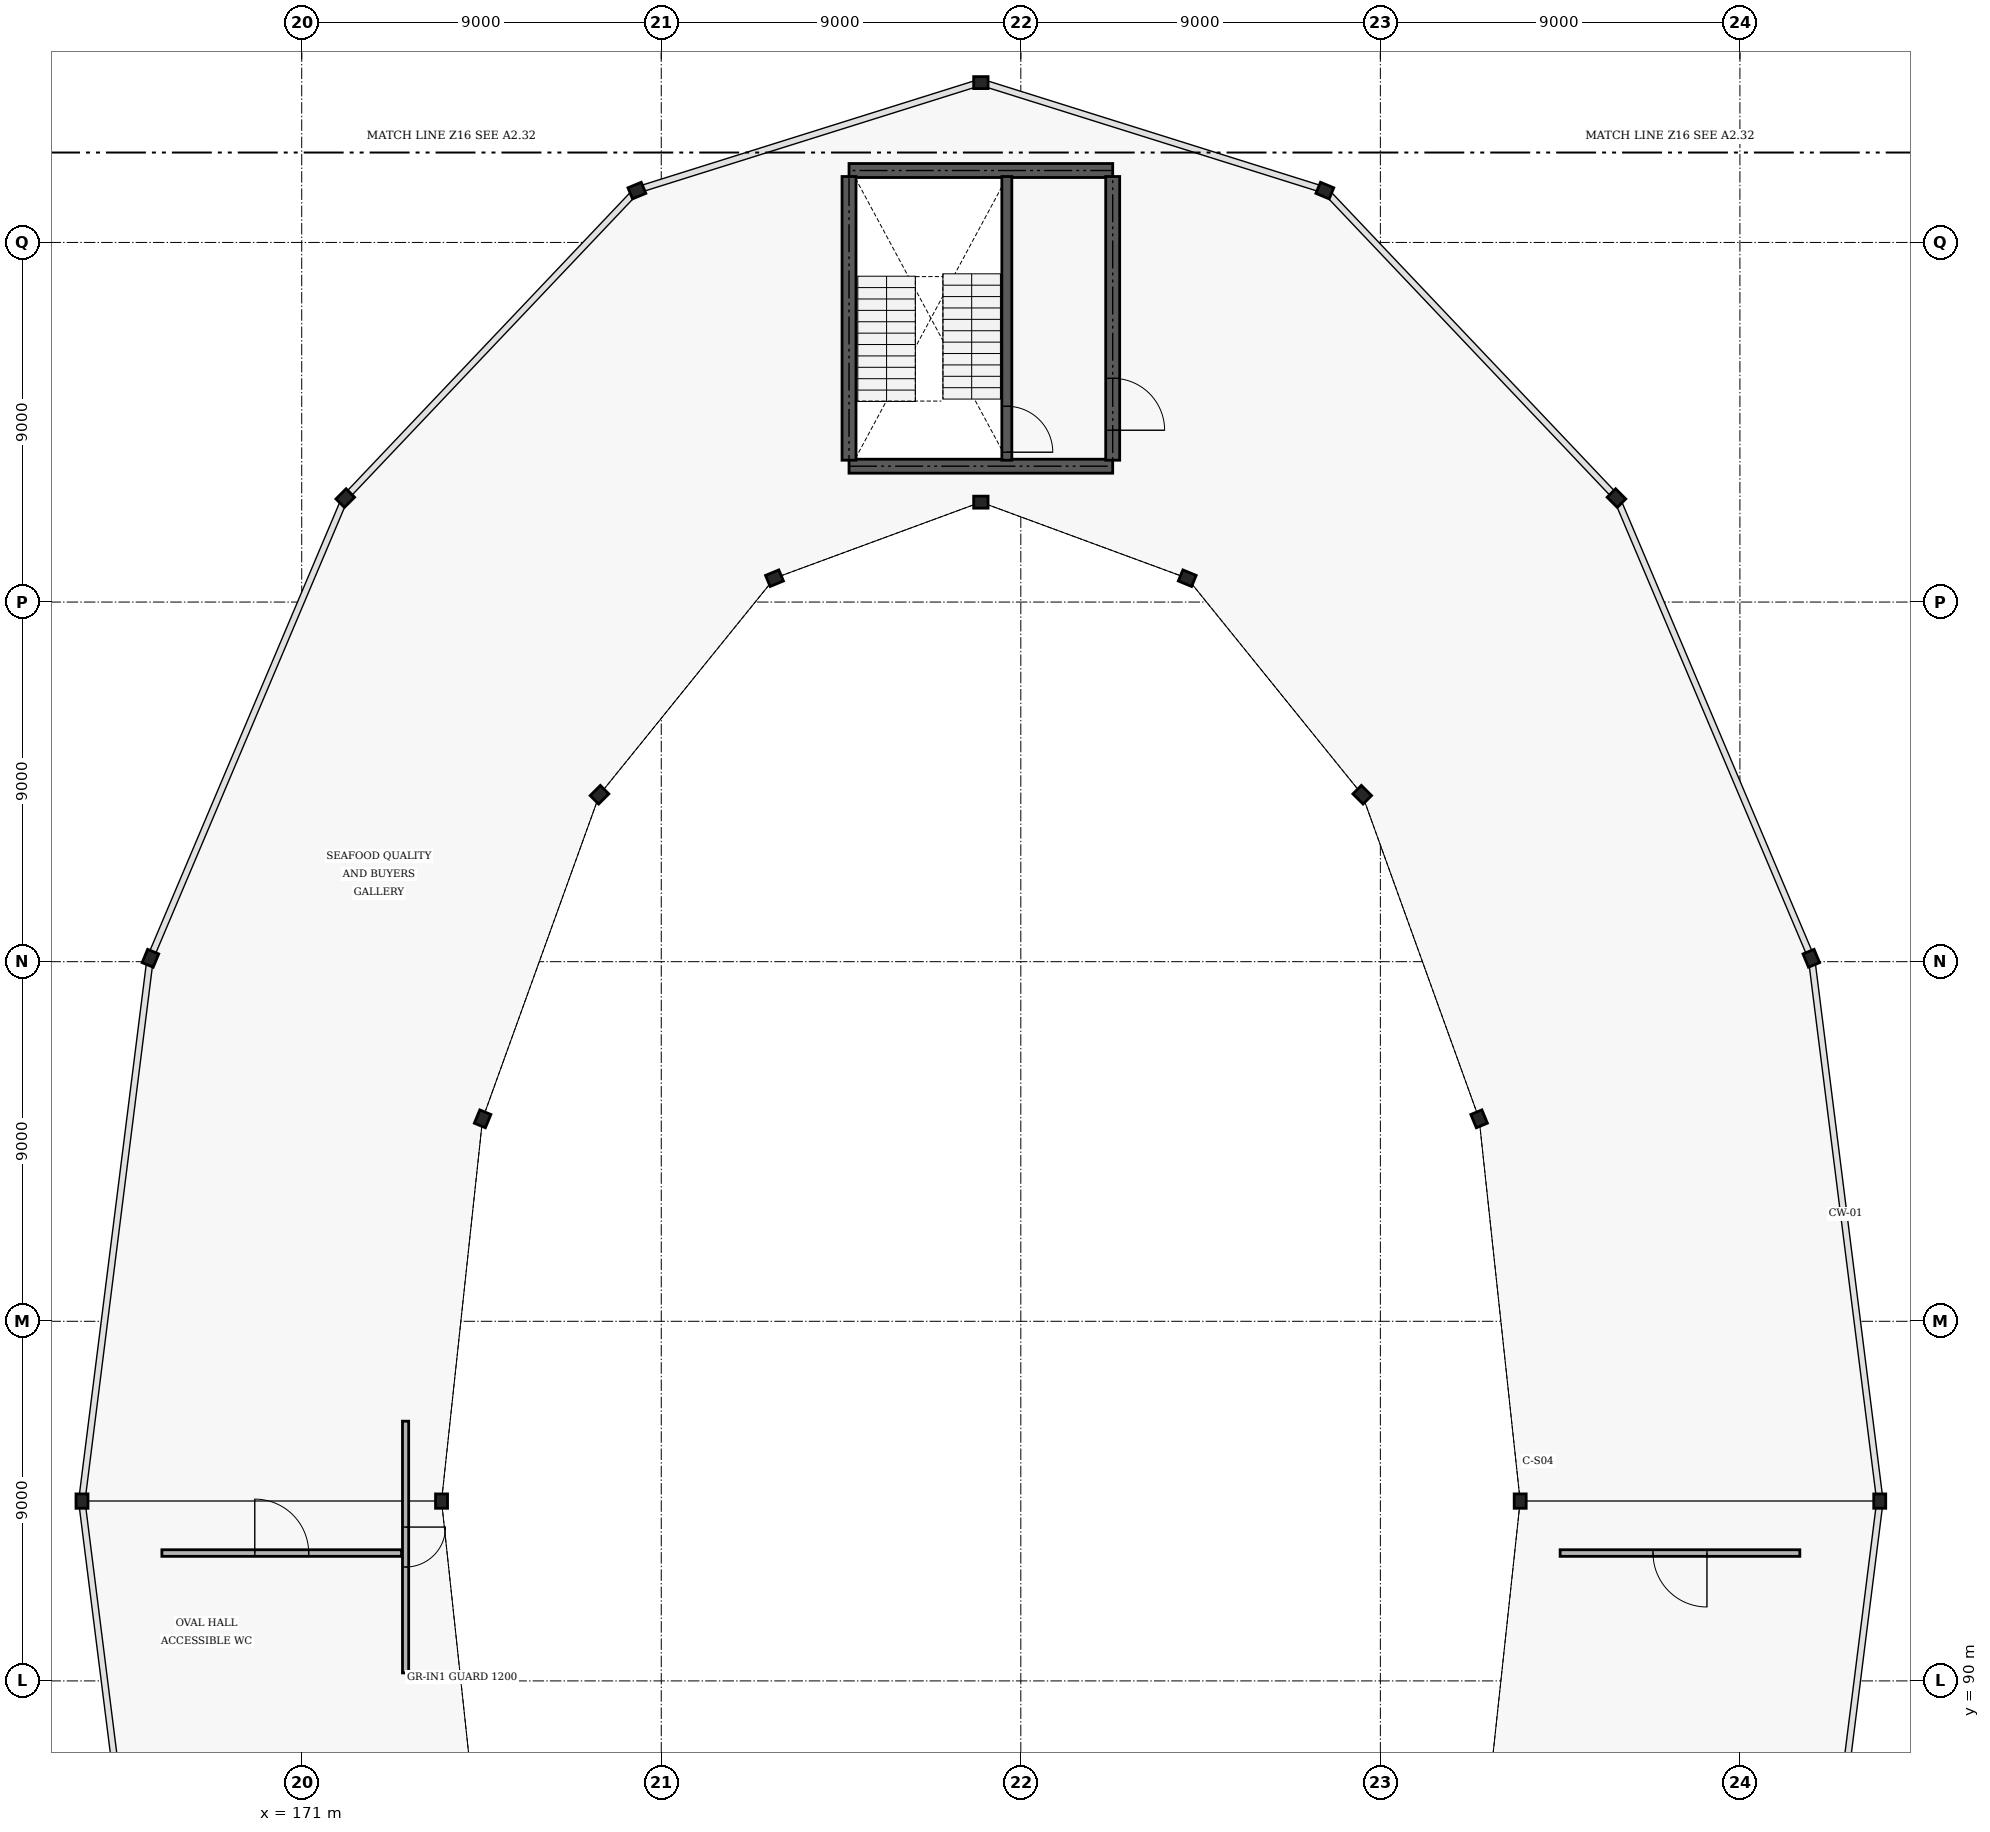
"""IFC4 building model, lengths in metres.
Left out: names, types, materials, properties, quantities, classifications, styles, units other than length and angle.
Written with IfcOpenShell. Run it as: python <this file> out.ifc"""

import sys

from ifc_helpers import new_model, si_unit, direction, frame, frame_2d, origin, origin_2d, place, context, subcontext, project, spatial, rectangle, i_section, extrude, element, fill, save


model = new_model("IFC4")
c1 = context("Model", 3, precision=1e-05, world=origin(), true_north=direction((0.0, 1.0)))
c2 = subcontext(c1, "Body", "Model", "MODEL_VIEW")
j1 = project(units=[si_unit("LENGTHUNIT", "METRE"), si_unit("PLANEANGLEUNIT", "RADIAN")], contexts=[c1])
p1 = place(None, origin())
s1 = spatial("IfcSite", under=j1, at=p1, CompositionType="ELEMENT")
p2 = place(p1, origin())
s2 = spatial("IfcBuilding", under=s1, at=p2, CompositionType="ELEMENT")
p3 = place(p2, frame((0.0, 0.0, 5.4)))
s3 = spatial("IfcBuildingStorey", under=s2, at=p3, CompositionType="ELEMENT", Elevation=5.4)
for number, where, z_axis, x_axis in (
    (1, (201.5, 94.5, 0.0), (0.0, 0.0, 1.0), (1.0, 0.0, 0.0)),
    (2, (210.5, 94.5, 0.0), (0.0, 0.0, 1.0), (1.0, 0.0, 0.0)),
    (3, (200.472, 104.067, 0.0), (0.0, 0.0, 1.0), (0.924, 0.383, 0.0)),
    (4, (208.787, 108.085, 0.0), (0.0, 0.0, 1.0), (0.924, 0.383, 0.0)),
    (5, (197.546, 112.178, 0.0), (0.0, 0.0, 1.0), (0.707, 0.707, 0.0)),
    (6, (203.91, 119.602, 0.0), (0.0, 0.0, 1.0), (0.707, 0.707, 0.0)),
    (7, (193.166, 117.597, 0.0), (0.0, 0.0, 1.0), (0.383, 0.924, 0.0)),
    (8, (196.61, 127.298, 0.0), (0.0, 0.0, 1.0), (0.383, 0.924, 0.0)),
    (9, (188.0, 119.5, 0.0), (0.0, 0.0, 1.0), (0.0, 1.0, 0.0)),
    (10, (188.0, 130.0, 0.0), (0.0, 0.0, 1.0), (0.0, 1.0, 0.0)),
    (11, (182.834, 117.597, 0.0), (0.0, 0.0, 1.0), (-0.383, 0.924, 0.0)),
    (12, (179.39, 127.298, 0.0), (0.0, 0.0, 1.0), (-0.383, 0.924, 0.0)),
    (13, (178.454, 112.178, 0.0), (0.0, 0.0, 1.0), (-0.707, 0.707, 0.0)),
    (14, (172.09, 119.602, 0.0), (0.0, 0.0, 1.0), (-0.707, 0.707, 0.0)),
    (15, (175.528, 104.067, 0.0), (0.0, 0.0, 1.0), (-0.924, 0.383, 0.0)),
    (16, (167.213, 108.085, 0.0), (0.0, 0.0, 1.0), (-0.924, 0.383, 0.0)),
    (17, (174.5, 94.5, 0.0), (0.0, 0.0, 1.0), (-1.0, 0.0, 0.0)),
    (18, (165.5, 94.5, 0.0), (0.0, 0.0, 1.0), (-1.0, 0.0, 0.0)),
):
    element("IfcColumn", number, at=place(p3, frame(where, z_axis=z_axis, x_axis=x_axis)), inside=s3, PredefinedType="COLUMN", context=c2, shape_type="SweptSolid", body=[
        extrude(i_section(OverallWidth=0.3, OverallDepth=0.36, WebThickness=0.012, FlangeThickness=0.022, FilletRadius=0.027, at=origin_2d()), origin(), (0.0, 0.0, 1.0), 4.2),
    ])
for number, where, z_axis, x_axis in (
    (19, (184.7, 120.4, 0.0), (0.0, 0.0, 1.0), (1.0, 0.0, 0.0)),
    (20, (184.7, 127.8, 0.0), (0.0, 0.0, 1.0), (1.0, 0.0, 0.0)),
):
    element("IfcWall", number, at=place(p3, frame(where, z_axis=z_axis, x_axis=x_axis)), inside=s3, PredefinedType="SHEAR", context=c2, shape_type="SweptSolid", body=[
        extrude(rectangle(XDim=6.6, YDim=0.35, at=frame_2d((3.3, 0.0))), origin(), (0.0, 0.0, 1.0), 4.2),
    ])
p4 = place(p3, frame((184.7, 120.55, 0.0), z_axis=(0.0, 0.0, 1.0), x_axis=(0.0, 1.0, 0.0)))
e21 = element("IfcWall", 21, at=p4, inside=s3, PredefinedType="SHEAR", context=c2, shape_type="SweptSolid", body=[
    extrude(rectangle(XDim=7.1, YDim=0.35, at=frame_2d((3.55, 0.0))), origin(), (0.0, 0.0, 1.0), 4.2),
])
p5 = place(p3, frame((191.3, 120.55, 0.0), z_axis=(0.0, 0.0, 1.0), x_axis=(0.0, 1.0, 0.0)))
e22 = element("IfcWall", 22, at=p5, inside=s3, PredefinedType="SHEAR", context=c2, shape_type="SweptSolid", body=[
    extrude(rectangle(XDim=7.1, YDim=0.35, at=frame_2d((3.55, 0.0))), origin(), (0.0, 0.0, 1.0), 4.2),
])
p6 = place(p5, frame((0.75, 0.0, 0.0)))
e23 = element("IfcOpeningElement", 23, at=p6, cuts=e22, PredefinedType="OPENING", context=c2, shape_type="SweptSolid", body=[
    extrude(rectangle(XDim=1.3, YDim=2.15, at=frame_2d((0.65, 1.075))), frame((0.0, 0.185, 0.0), z_axis=(0.0, -1.0, 0.0), x_axis=(1.0, 0.0, 0.0)), (0.0, 0.0, 1.0), 0.37),
])
p7 = place(p3, frame((188.65, 120.55, 0.0), z_axis=(0.0, 0.0, 1.0), x_axis=(0.0, 1.0, 0.0)))
e24 = element("IfcWall", 24, at=p7, inside=s3, PredefinedType="SHEAR", context=c2, shape_type="SweptSolid", body=[
    extrude(rectangle(XDim=7.1, YDim=0.25, at=frame_2d((3.55, 0.0))), origin(), (0.0, 0.0, 1.0), 4.2),
])
p8 = place(p7, frame((0.2, 0.0, 0.0)))
e25 = element("IfcOpeningElement", 25, at=p8, cuts=e24, PredefinedType="OPENING", context=c2, shape_type="SweptSolid", body=[
    extrude(rectangle(XDim=1.15, YDim=2.15, at=frame_2d((0.575, 1.075))), frame((0.0, 0.135, 0.0), z_axis=(0.0, -1.0, 0.0), x_axis=(1.0, 0.0, 0.0)), (0.0, 0.0, 1.0), 0.27),
])
p9 = place(p3, frame((173.6, 90.2, 0.0), z_axis=(0.0, 0.0, 1.0), x_axis=(0.0, 1.0, 0.0)))
e26 = element("IfcWall", 26, at=p9, inside=s3, PredefinedType="PARTITIONING", context=c2, shape_type="SweptSolid", body=[
    extrude(rectangle(XDim=6.3, YDim=0.155, at=frame_2d((3.15, 0.0))), origin(), (0.0, 0.0, 1.0), 3.2),
])
p10 = place(p9, frame((2.65, 0.0, 0.0)))
e27 = element("IfcOpeningElement", 27, at=p10, cuts=e26, PredefinedType="OPENING", context=c2, shape_type="SweptSolid", body=[
    extrude(rectangle(XDim=1.0, YDim=2.1, at=frame_2d((0.5, 1.05))), frame((0.0, 0.087, 0.0), z_axis=(0.0, -1.0, 0.0), x_axis=(1.0, 0.0, 0.0)), (0.0, 0.0, 1.0), 0.175),
])
p11 = place(p3, frame((167.5, 93.2, 0.0), z_axis=(0.0, 0.0, 1.0), x_axis=(1.0, 0.0, 0.0)))
e28 = element("IfcWall", 28, at=p11, inside=s3, PredefinedType="PARTITIONING", context=c2, shape_type="SweptSolid", body=[
    extrude(rectangle(XDim=6.0, YDim=0.165, at=frame_2d((3.0, 0.0))), origin(), (0.0, 0.0, 1.0), 3.2),
])
p12 = place(p11, frame((2.325, 0.0, 0.0)))
e29 = element("IfcOpeningElement", 29, at=p12, cuts=e28, PredefinedType="OPENING", context=c2, shape_type="SweptSolid", body=[
    extrude(rectangle(XDim=1.35, YDim=2.2, at=frame_2d((0.675, 1.1))), frame((0.0, 0.093, 0.0), z_axis=(0.0, -1.0, 0.0), x_axis=(1.0, 0.0, 0.0)), (0.0, 0.0, 1.0), 0.185),
])
p13 = place(p3, frame((202.5, 93.2, 0.0), z_axis=(0.0, 0.0, 1.0), x_axis=(1.0, 0.0, 0.0)))
e30 = element("IfcWall", 30, at=p13, inside=s3, PredefinedType="PARTITIONING", context=c2, shape_type="SweptSolid", body=[
    extrude(rectangle(XDim=6.0, YDim=0.165, at=frame_2d((3.0, 0.0))), origin(), (0.0, 0.0, 1.0), 3.2),
])
p14 = place(p13, frame((2.325, 0.0, 0.0)))
e31 = element("IfcOpeningElement", 31, at=p14, cuts=e30, PredefinedType="OPENING", context=c2, shape_type="SweptSolid", body=[
    extrude(rectangle(XDim=1.35, YDim=2.2, at=frame_2d((0.675, 1.1))), frame((0.0, 0.093, 0.0), z_axis=(0.0, -1.0, 0.0), x_axis=(1.0, 0.0, 0.0)), (0.0, 0.0, 1.0), 0.185),
])
p15 = place(p6, frame((1.3, 0.0, 0.0), z_axis=(0.0, 0.0, 1.0), x_axis=(-1.0, 0.0, 0.0)))
e32 = element("IfcDoor", 32, at=p15, inside=s3, OperationType="DOUBLE_DOOR_SINGLE_SWING", PredefinedType="DOOR", context=c2, shape_type="SweptSolid", body=[
    extrude(rectangle(XDim=1.3, YDim=2.15, at=frame_2d((0.65, 1.075))), frame((0.0, 0.025, 0.0), z_axis=(0.0, -1.0, 0.0), x_axis=(1.0, 0.0, 0.0)), (0.0, 0.0, 1.0), 0.05),
])
fill(e23, e32)
p16 = place(p8, frame((1.15, 0.0, 0.0), z_axis=(0.0, 0.0, 1.0), x_axis=(-1.0, 0.0, 0.0)))
e33 = element("IfcDoor", 33, at=p16, inside=s3, OperationType="SINGLE_SWING_LEFT", PredefinedType="DOOR", context=c2, shape_type="SweptSolid", body=[
    extrude(rectangle(XDim=1.15, YDim=2.15, at=frame_2d((0.575, 1.075))), frame((0.0, 0.025, 0.0), z_axis=(0.0, -1.0, 0.0), x_axis=(1.0, 0.0, 0.0)), (0.0, 0.0, 1.0), 0.05),
])
fill(e25, e33)
p17 = place(p10, origin())
e34 = element("IfcDoor", 34, at=p17, inside=s3, OperationType="SINGLE_SWING_RIGHT", PredefinedType="DOOR", context=c2, shape_type="SweptSolid", body=[
    extrude(rectangle(XDim=1.0, YDim=2.1, at=frame_2d((0.5, 1.05))), frame((0.0, 0.025, 0.0), z_axis=(0.0, -1.0, 0.0), x_axis=(1.0, 0.0, 0.0)), (0.0, 0.0, 1.0), 0.05),
])
fill(e27, e34)
p18 = place(p12, origin())
e35 = element("IfcDoor", 35, at=p18, inside=s3, OperationType="SINGLE_SWING_LEFT", PredefinedType="DOOR", context=c2, shape_type="SweptSolid", body=[
    extrude(rectangle(XDim=1.35, YDim=2.2, at=frame_2d((0.675, 1.1))), frame((0.0, 0.025, 0.0), z_axis=(0.0, -1.0, 0.0), x_axis=(1.0, 0.0, 0.0)), (0.0, 0.0, 1.0), 0.05),
])
fill(e29, e35)
p19 = place(p14, origin())
e36 = element("IfcDoor", 36, at=p19, inside=s3, OperationType="SINGLE_SWING_RIGHT", PredefinedType="DOOR", context=c2, shape_type="SweptSolid", body=[
    extrude(rectangle(XDim=1.35, YDim=2.2, at=frame_2d((0.675, 1.1))), frame((0.0, 0.025, 0.0), z_axis=(0.0, -1.0, 0.0), x_axis=(1.0, 0.0, 0.0)), (0.0, 0.0, 1.0), 0.05),
])
fill(e31, e36)
save(model, sys.argv[1])
